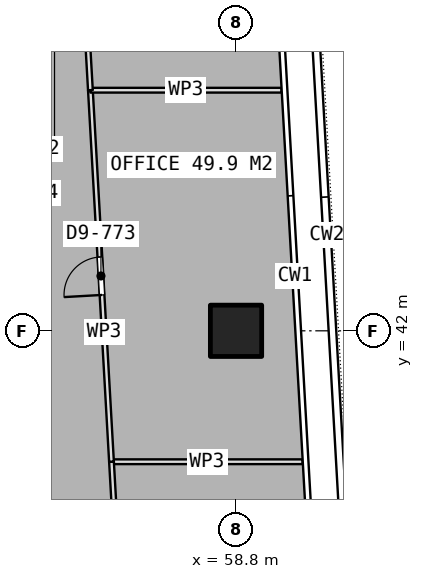
"""IFC4 building model, lengths in metres.
Left out: names, types, materials, properties, quantities, classifications, styles, units other than length and angle.
Written with IfcOpenShell. Run it as: python <this file> out.ifc"""

import sys

from ifc_helpers import new_model, si_unit, direction, frame, frame_2d, origin, origin_2d, place, context, subcontext, project, spatial, rectangle, extrude, element, fill, save


model = new_model("IFC4")
c1 = context("Model", 3, precision=1e-05, world=origin(), true_north=direction((0.0, 1.0)))
c2 = subcontext(c1, "Body", "Model", "MODEL_VIEW")
j1 = project(units=[si_unit("LENGTHUNIT", "METRE"), si_unit("PLANEANGLEUNIT", "RADIAN")], contexts=[c1])
p1 = place(None, origin())
s1 = spatial("IfcSite", under=j1, at=p1, CompositionType="ELEMENT")
p2 = place(p1, origin())
s2 = spatial("IfcBuilding", under=s1, at=p2, CompositionType="ELEMENT")
p3 = place(p2, frame((0.0, 0.0, 191.45)))
s3 = spatial("IfcBuildingStorey", under=s2, at=p3, CompositionType="ELEMENT", Elevation=191.45)
p4 = place(p3, frame((58.8, 42.0, 0.0), z_axis=(0.0, 0.0, 1.0), x_axis=(1.0, 0.0, 0.0)))
e1 = element("IfcColumn", 1, at=p4, inside=s3, PredefinedType="COLUMN", context=c2, shape_type="SweptSolid", body=[
    extrude(rectangle(XDim=1.35, YDim=1.35, at=origin_2d()), origin(), (0.0, 0.0, 1.0), 3.75),
])
p5 = place(p3, frame((55.523, 38.555, 0.0), z_axis=(0.0, 0.0, 1.0), x_axis=(1.0, 0.0, 0.0)))
e2 = element("IfcWall", 2, at=p5, inside=s3, PredefinedType="PARTITIONING", context=c2, shape_type="SweptSolid", body=[
    extrude(rectangle(XDim=5.028, YDim=0.125, at=frame_2d((2.514, 0.0))), origin(), (0.0, 0.0, 1.0), 3.5),
])
p6 = place(p3, frame((56.067, 28.972, 0.0), z_axis=(0.0, 0.0, 1.0), x_axis=(-0.056670220537, 0.99839295175, 0.0)))
e3 = element("IfcWall", 3, at=p6, inside=s3, PredefinedType="PARTITIONING", context=c2, shape_type="SweptSolid", body=[
    extrude(rectangle(XDim=9.598, YDim=0.125, at=frame_2d((4.799, 0.0))), origin(), (0.0, 0.0, 1.0), 3.5),
])
p7 = place(p6, frame((4.299, 0.0, 0.0)))
e4 = element("IfcOpeningElement", 4, at=p7, cuts=e3, PredefinedType="OPENING", context=c2, shape_type="SweptSolid", body=[
    extrude(rectangle(XDim=1.0, YDim=2.1, at=frame_2d((0.5, 1.05))), frame((0.0, 0.073, 0.0), z_axis=(0.0, -1.0, 0.0), x_axis=(1.0, 0.0, 0.0)), (0.0, 0.0, 1.0), 0.145),
])
p8 = place(p3, frame((55.523, 38.556, 0.0), z_axis=(0.0, 0.0, 1.0), x_axis=(-0.056678391694, 0.99839248791, 0.0)))
e5 = element("IfcWall", 5, at=p8, inside=s3, PredefinedType="PARTITIONING", context=c2, shape_type="SweptSolid", body=[
    extrude(rectangle(XDim=9.791, YDim=0.125, at=frame_2d((4.896, 0.0))), origin(), (0.0, 0.0, 1.0), 3.5),
])
p9 = place(p8, frame((4.395, 0.0, 0.0)))
e6 = element("IfcOpeningElement", 6, at=p9, cuts=e5, PredefinedType="OPENING", context=c2, shape_type="SweptSolid", body=[
    extrude(rectangle(XDim=1.0, YDim=2.1, at=frame_2d((0.5, 1.05))), frame((0.0, 0.073, 0.0), z_axis=(0.0, -1.0, 0.0), x_axis=(1.0, 0.0, 0.0)), (0.0, 0.0, 1.0), 0.145),
])
p10 = place(p3, frame((54.968, 48.331, 0.0), z_axis=(0.0, 0.0, 1.0), x_axis=(1.0, 0.0, 0.0)))
e7 = element("IfcWall", 7, at=p10, inside=s3, PredefinedType="PARTITIONING", context=c2, shape_type="SweptSolid", body=[
    extrude(rectangle(XDim=5.028, YDim=0.125, at=frame_2d((2.514, 0.0))), origin(), (0.0, 0.0, 1.0), 3.5),
])
p11 = place(p3, frame((54.968, 48.332, 0.0), z_axis=(0.0, 0.0, 1.0), x_axis=(-0.056680388523, 0.998392374549, 0.0)))
e8 = element("IfcWall", 8, at=p11, inside=s3, PredefinedType="PARTITIONING", context=c2, shape_type="SweptSolid", body=[
    extrude(rectangle(XDim=7.585, YDim=0.125, at=frame_2d((3.792, 0.0))), origin(), (0.0, 0.0, 1.0), 3.5),
])
p12 = place(p11, frame((2.893, 0.0, 0.0)))
e9 = element("IfcOpeningElement", 9, at=p12, cuts=e8, PredefinedType="OPENING", context=c2, shape_type="SweptSolid", body=[
    extrude(rectangle(XDim=1.8, YDim=2.1, at=frame_2d((0.9, 1.05))), frame((0.0, 0.073, 0.0), z_axis=(0.0, -1.0, 0.0), x_axis=(1.0, 0.0, 0.0)), (0.0, 0.0, 1.0), 0.145),
])
p13 = place(p9, origin())
e10 = element("IfcDoor", 10, at=p13, inside=s3, OperationType="SINGLE_SWING_LEFT", PredefinedType="DOOR", context=c2, shape_type="SweptSolid", body=[
    extrude(rectangle(XDim=1.0, YDim=2.1, at=frame_2d((0.5, 1.05))), frame((0.0, 0.025, 0.0), z_axis=(0.0, -1.0, 0.0), x_axis=(1.0, 0.0, 0.0)), (0.0, 0.0, 1.0), 0.05),
])
fill(e6, e10)
save(model, sys.argv[1])
